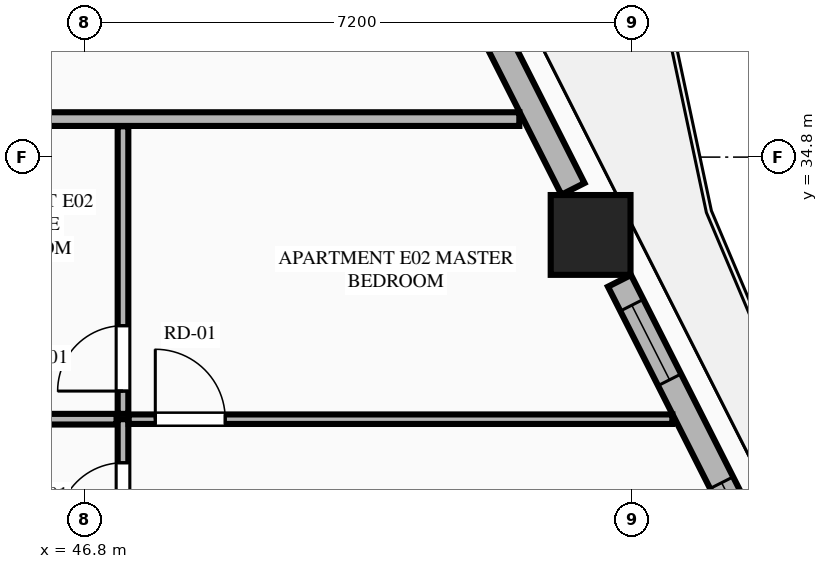
"""IFC4 building model, lengths in metres.
Left out: names, types, materials, properties, quantities, classifications, styles, units other than length and angle.
Written with IfcOpenShell. Run it as: python <this file> out.ifc"""

import sys

from ifc_helpers import new_model, si_unit, direction, frame, frame_2d, origin, origin_2d, place, context, subcontext, project, spatial, rectangle, extrude, element, fill, save


model = new_model("IFC4")
c1 = context("Model", 3, precision=1e-05, world=origin(), true_north=direction((0.0, 1.0)))
c2 = subcontext(c1, "Body", "Model", "MODEL_VIEW")
j1 = project(units=[si_unit("LENGTHUNIT", "METRE"), si_unit("PLANEANGLEUNIT", "RADIAN")], contexts=[c1])
p1 = place(None, origin())
s1 = spatial("IfcSite", under=j1, at=p1, CompositionType="ELEMENT")
p2 = place(p1, origin())
s2 = spatial("IfcBuilding", under=s1, at=p2, CompositionType="ELEMENT")
p3 = place(p2, frame((0.0, 0.0, 133.9)))
s3 = spatial("IfcBuildingStorey", under=s2, at=p3, CompositionType="ELEMENT", Elevation=133.9)
p4 = place(p3, frame((53.452, 33.776, 0.0), z_axis=(0.0, 0.0, 1.0), x_axis=(1.0, 0.0, 0.0)))
e1 = element("IfcColumn", 1, at=p4, inside=s3, PredefinedType="COLUMN", context=c2, shape_type="SweptSolid", body=[
    extrude(rectangle(XDim=1.05, YDim=1.05, at=origin_2d()), origin(), (0.0, 0.0, 1.0), 3.55),
])
p5 = place(p3, frame((56.087, 28.715, 0.0), z_axis=(0.0, 0.0, 1.0), x_axis=(-0.451431617681, 0.892305718102, 0.0)))
e2 = element("IfcWall", 2, at=p5, inside=s3, PredefinedType="STANDARD", context=c2, shape_type="SweptSolid", body=[
    extrude(rectangle(XDim=4.995, YDim=0.34, at=frame_2d((2.498, 0.0))), origin(), (0.0, 0.0, 1.0), 2.797),
])
p6 = place(p5, frame((0.919, 0.0, 0.75)))
e3 = element("IfcOpeningElement", 3, at=p6, cuts=e2, PredefinedType="OPENING", context=c2, shape_type="SweptSolid", body=[
    extrude(rectangle(XDim=1.1, YDim=1.897, at=frame_2d((0.55, 0.948))), frame((0.0, 0.18, 0.0), z_axis=(0.0, -1.0, 0.0), x_axis=(1.0, 0.0, 0.0)), (0.0, 0.0, 1.0), 0.36),
])
p7 = place(p5, frame((3.536, 0.0, 0.75)))
e4 = element("IfcOpeningElement", 4, at=p7, cuts=e2, PredefinedType="OPENING", context=c2, shape_type="SweptSolid", body=[
    extrude(rectangle(XDim=1.1, YDim=1.897, at=frame_2d((0.55, 0.948))), frame((0.0, 0.18, 0.0), z_axis=(0.0, -1.0, 0.0), x_axis=(1.0, 0.0, 0.0)), (0.0, 0.0, 1.0), 0.36),
])
p8 = place(p3, frame((53.22, 34.382, 0.0), z_axis=(0.0, 0.0, 1.0), x_axis=(-0.451567731634, 0.892236842855, 0.0)))
e5 = element("IfcWall", 5, at=p8, inside=s3, PredefinedType="STANDARD", context=c2, shape_type="SweptSolid", body=[
    extrude(rectangle(XDim=5.219, YDim=0.34, at=frame_2d((2.61, 0.0))), origin(), (0.0, 0.0, 1.0), 2.797),
])
p9 = place(p8, frame((2.699, 0.0, 0.0)))
e6 = element("IfcOpeningElement", 6, at=p9, cuts=e5, PredefinedType="OPENING", context=c2, shape_type="SweptSolid", body=[
    extrude(rectangle(XDim=1.1, YDim=2.25, at=frame_2d((0.55, 1.125))), frame((0.0, 0.18, 0.0), z_axis=(0.0, -1.0, 0.0), x_axis=(1.0, 0.0, 0.0)), (0.0, 0.0, 1.0), 0.36),
])
p10 = place(p3, frame((44.845, 35.3, 0.0), z_axis=(0.0, 0.0, 1.0), x_axis=(1.0, 0.0, 0.0)))
e7 = element("IfcWall", 7, at=p10, inside=s3, PredefinedType="PARTITIONING", context=c2, shape_type="SweptSolid", body=[
    extrude(rectangle(XDim=7.669, YDim=0.18, at=frame_2d((3.834, 0.0))), origin(), (0.0, 0.0, 1.0), 3.34),
])
p11 = place(p3, frame((47.3, 27.95, 0.0), z_axis=(0.0, 0.0, 1.0), x_axis=(0.0, 1.0, 0.0)))
e8 = element("IfcWall", 8, at=p11, inside=s3, PredefinedType="PLUMBINGWALL", context=c2, shape_type="SweptSolid", body=[
    extrude(rectangle(XDim=3.402, YDim=0.14, at=frame_2d((1.701, 0.0))), origin(), (0.0, 0.0, 1.0), 3.34),
])
p12 = place(p11, frame((0.2, 0.0, 0.0)))
e9 = element("IfcOpeningElement", 9, at=p12, cuts=e8, PredefinedType="OPENING", context=c2, shape_type="SweptSolid", body=[
    extrude(rectangle(XDim=0.88, YDim=2.15, at=frame_2d((0.44, 1.075))), frame((0.0, 0.08, 0.0), z_axis=(0.0, -1.0, 0.0), x_axis=(1.0, 0.0, 0.0)), (0.0, 0.0, 1.0), 0.16),
])
p13 = place(p11, frame((1.969, 0.0, 0.0)))
e10 = element("IfcOpeningElement", 10, at=p13, cuts=e8, PredefinedType="OPENING", context=c2, shape_type="SweptSolid", body=[
    extrude(rectangle(XDim=0.86, YDim=2.1, at=frame_2d((0.43, 1.05))), frame((0.0, 0.08, 0.0), z_axis=(0.0, -1.0, 0.0), x_axis=(1.0, 0.0, 0.0)), (0.0, 0.0, 1.0), 0.16),
])
p14 = place(p3, frame((47.3, 31.422, 0.0), z_axis=(0.0, 0.0, 1.0), x_axis=(0.0, 1.0, 0.0)))
e11 = element("IfcWall", 11, at=p14, inside=s3, PredefinedType="PLUMBINGWALL", context=c2, shape_type="SweptSolid", body=[
    extrude(rectangle(XDim=3.783, YDim=0.14, at=frame_2d((1.892, 0.0))), origin(), (0.0, 0.0, 1.0), 3.34),
])
p15 = place(p14, frame((0.3, 0.0, 0.0)))
e12 = element("IfcOpeningElement", 12, at=p15, cuts=e11, PredefinedType="OPENING", context=c2, shape_type="SweptSolid", body=[
    extrude(rectangle(XDim=0.86, YDim=2.1, at=frame_2d((0.43, 1.05))), frame((0.0, 0.08, 0.0), z_axis=(0.0, -1.0, 0.0), x_axis=(1.0, 0.0, 0.0)), (0.0, 0.0, 1.0), 0.16),
])
p16 = place(p3, frame((44.635, 31.352, 0.0), z_axis=(0.0, 0.0, 1.0), x_axis=(1.0, 0.0, 0.0)))
e13 = element("IfcWall", 13, at=p16, inside=s3, PredefinedType="PLUMBINGWALL", context=c2, shape_type="SweptSolid", body=[
    extrude(rectangle(XDim=2.58, YDim=0.14, at=frame_2d((1.29, 0.0))), origin(), (0.0, 0.0, 1.0), 3.34),
])
p17 = place(p3, frame((47.375, 31.352, 0.0), z_axis=(0.0, 0.0, 1.0), x_axis=(1.0, 0.0, 0.0)))
e14 = element("IfcWall", 14, at=p17, inside=s3, PredefinedType="PARTITIONING", context=c2, shape_type="SweptSolid", body=[
    extrude(rectangle(XDim=7.152, YDim=0.125, at=frame_2d((3.576, 0.0))), origin(), (0.0, 0.0, 1.0), 3.34),
])
p18 = place(p17, frame((0.35, 0.0, 0.0)))
e15 = element("IfcOpeningElement", 15, at=p18, cuts=e14, PredefinedType="OPENING", context=c2, shape_type="SweptSolid", body=[
    extrude(rectangle(XDim=0.92, YDim=2.15, at=frame_2d((0.46, 1.075))), frame((0.0, 0.073, 0.0), z_axis=(0.0, -1.0, 0.0), x_axis=(1.0, 0.0, 0.0)), (0.0, 0.0, 1.0), 0.145),
])
p19 = place(p6, origin())
e16 = element("IfcWindow", 16, at=p19, inside=s3, PartitioningType="SINGLE_PANEL", PredefinedType="WINDOW", context=c2, shape_type="SweptSolid", body=[
    extrude(rectangle(XDim=1.1, YDim=1.897, at=frame_2d((0.55, 0.948))), frame((0.0, 0.03, 0.0), z_axis=(0.0, -1.0, 0.0), x_axis=(1.0, 0.0, 0.0)), (0.0, 0.0, 1.0), 0.06),
])
fill(e3, e16)
p20 = place(p13, origin())
e17 = element("IfcDoor", 17, at=p20, inside=s3, OperationType="SINGLE_SWING_LEFT", PredefinedType="DOOR", context=c2, shape_type="SweptSolid", body=[
    extrude(rectangle(XDim=0.86, YDim=2.1, at=frame_2d((0.43, 1.05))), frame((0.0, 0.025, 0.0), z_axis=(0.0, -1.0, 0.0), x_axis=(1.0, 0.0, 0.0)), (0.0, 0.0, 1.0), 0.05),
])
fill(e10, e17)
p21 = place(p15, origin())
e18 = element("IfcDoor", 18, at=p21, inside=s3, OperationType="SINGLE_SWING_LEFT", PredefinedType="DOOR", context=c2, shape_type="SweptSolid", body=[
    extrude(rectangle(XDim=0.86, YDim=2.1, at=frame_2d((0.43, 1.05))), frame((0.0, 0.025, 0.0), z_axis=(0.0, -1.0, 0.0), x_axis=(1.0, 0.0, 0.0)), (0.0, 0.0, 1.0), 0.05),
])
fill(e12, e18)
p22 = place(p18, origin())
e19 = element("IfcDoor", 19, at=p22, inside=s3, OperationType="SINGLE_SWING_LEFT", PredefinedType="DOOR", context=c2, shape_type="SweptSolid", body=[
    extrude(rectangle(XDim=0.92, YDim=2.15, at=frame_2d((0.46, 1.075))), frame((0.0, 0.025, 0.0), z_axis=(0.0, -1.0, 0.0), x_axis=(1.0, 0.0, 0.0)), (0.0, 0.0, 1.0), 0.05),
])
fill(e15, e19)
p23 = place(p7, origin())
e20 = element("IfcWindow", 20, at=p23, inside=s3, PartitioningType="SINGLE_PANEL", PredefinedType="WINDOW", context=c2, shape_type="SweptSolid", body=[
    extrude(rectangle(XDim=1.1, YDim=1.897, at=frame_2d((0.55, 0.948))), frame((0.0, 0.03, 0.0), z_axis=(0.0, -1.0, 0.0), x_axis=(1.0, 0.0, 0.0)), (0.0, 0.0, 1.0), 0.06),
])
fill(e4, e20)
save(model, sys.argv[1])
